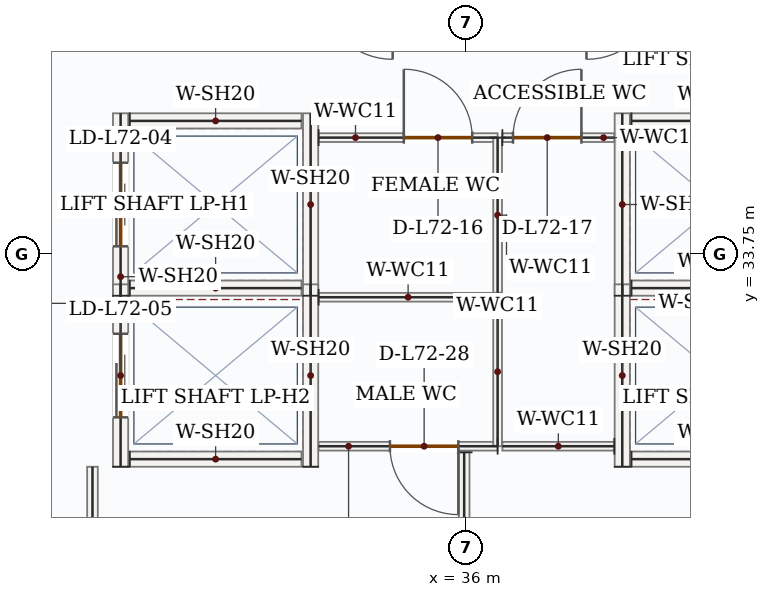
"""IFC4 building model, lengths in metres.
Left out: names, types, materials, properties, quantities, classifications, styles, units other than length and angle.
Written with IfcOpenShell. Run it as: python <this file> out.ifc"""

import sys

from ifc_helpers import new_model, si_unit, direction, frame, frame_2d, origin, place, context, subcontext, project, spatial, rectangle, extrude, source, transform, mapped, element, fill, save


model = new_model("IFC4")
c1 = context("Model", 3, precision=1e-05, world=origin(), true_north=direction((0.0, 1.0)))
c2 = subcontext(c1, "Body", "Model", "MODEL_VIEW")
j1 = project(units=[si_unit("LENGTHUNIT", "METRE"), si_unit("PLANEANGLEUNIT", "RADIAN")], contexts=[c1])
p1 = place(None, origin())
s1 = spatial("IfcSite", under=j1, at=p1, CompositionType="ELEMENT")
p2 = place(p1, origin())
s2 = spatial("IfcBuilding", under=s1, at=p2, CompositionType="ELEMENT")
p3 = place(p2, frame((0.0, 0.0, 299.1)))
s3 = spatial("IfcBuildingStorey", under=s2, at=p3, CompositionType="ELEMENT", Elevation=299.1)
p4 = place(p3, frame((31.45, 33.2, 0.0), z_axis=(0.0, 0.0, 1.0), x_axis=(0.0, 1.0, 0.0)))
e1 = element("IfcWall", 1, at=p4, inside=s3, PredefinedType="SOLIDWALL", context=c2, shape_type="SweptSolid", body=[
    extrude(rectangle(XDim=2.4, YDim=0.2, at=frame_2d((1.2, 0.0))), origin(), (0.0, 0.0, 1.0), 3.5),
])
p5 = place(p4, frame((0.65, 0.0, 0.0)))
e2 = element("IfcOpeningElement", 2, at=p5, cuts=e1, PredefinedType="OPENING", context=c2, shape_type="SweptSolid", body=[
    extrude(rectangle(XDim=1.1, YDim=2.15, at=frame_2d((0.55, 1.075))), frame((0.0, 0.11, 0.0), z_axis=(0.0, -1.0, 0.0), x_axis=(1.0, 0.0, 0.0)), (0.0, 0.0, 1.0), 0.22),
])
m1 = source(origin(), c2, "Body", "SweptSolid", [
    extrude(rectangle(XDim=2.4, YDim=0.2, at=frame_2d((1.2, 0.0))), origin(), (0.0, 0.0, 1.0), 3.5),
])
p6 = place(p3, frame((33.95, 33.2, 0.0), z_axis=(0.0, 0.0, 1.0), x_axis=(0.0, 1.0, 0.0)))
e3 = element("IfcWall", 3, at=p6, inside=s3, PredefinedType="SOLIDWALL", context=c2, shape_type="MappedRepresentation", body=[
    mapped(m1, transform((0.0, 0.0, 0.0), x_axis=(1.0, 0.0, 0.0), y_axis=(0.0, 1.0, 0.0), z_axis=(0.0, 0.0, 1.0), scale=1.0)),
])
m2 = source(origin(), c2, "Body", "SweptSolid", [
    extrude(rectangle(XDim=2.26, YDim=0.2, at=frame_2d((1.13, 0.0))), origin(), (0.0, 0.0, 1.0), 3.5),
])
for number, where, z_axis, x_axis in (
    (4, (31.57, 33.3, 0.0), (0.0, 0.0, 1.0), (1.0, 0.0, 0.0)),
    (5, (31.57, 35.5, 0.0), (0.0, 0.0, 1.0), (1.0, 0.0, 0.0)),
):
    element("IfcWall", number, at=place(p3, frame(where, z_axis=z_axis, x_axis=x_axis)), inside=s3, PredefinedType="SOLIDWALL", context=c2, shape_type="MappedRepresentation", body=[
        mapped(m2, transform((0.0, 0.0, 0.0), x_axis=(1.0, 0.0, 0.0), y_axis=(0.0, 1.0, 0.0), z_axis=(0.0, 0.0, 1.0), scale=1.0)),
    ])
p7 = place(p3, frame((31.45, 30.95, 0.0), z_axis=(0.0, 0.0, 1.0), x_axis=(0.0, 1.0, 0.0)))
e6 = element("IfcWall", 6, at=p7, inside=s3, PredefinedType="SOLIDWALL", context=c2, shape_type="SweptSolid", body=[
    extrude(rectangle(XDim=2.4, YDim=0.2, at=frame_2d((1.2, 0.0))), origin(), (0.0, 0.0, 1.0), 3.5),
])
p8 = place(p7, frame((0.65, 0.0, 0.0)))
e7 = element("IfcOpeningElement", 7, at=p8, cuts=e6, PredefinedType="OPENING", context=c2, shape_type="SweptSolid", body=[
    extrude(rectangle(XDim=1.1, YDim=2.15, at=frame_2d((0.55, 1.075))), frame((0.0, 0.11, 0.0), z_axis=(0.0, -1.0, 0.0), x_axis=(1.0, 0.0, 0.0)), (0.0, 0.0, 1.0), 0.22),
])
p9 = place(p3, frame((33.95, 30.95, 0.0), z_axis=(0.0, 0.0, 1.0), x_axis=(0.0, 1.0, 0.0)))
e8 = element("IfcWall", 8, at=p9, inside=s3, PredefinedType="SOLIDWALL", context=c2, shape_type="MappedRepresentation", body=[
    mapped(m1, transform((0.0, 0.0, 0.0), x_axis=(1.0, 0.0, 0.0), y_axis=(0.0, 1.0, 0.0), z_axis=(0.0, 0.0, 1.0), scale=1.0)),
])
p10 = place(p3, frame((31.57, 31.05, 0.0), z_axis=(0.0, 0.0, 1.0), x_axis=(1.0, 0.0, 0.0)))
e9 = element("IfcWall", 9, at=p10, inside=s3, PredefinedType="SOLIDWALL", context=c2, shape_type="MappedRepresentation", body=[
    mapped(m2, transform((0.0, 0.0, 0.0), x_axis=(1.0, 0.0, 0.0), y_axis=(0.0, 1.0, 0.0), z_axis=(0.0, 0.0, 1.0), scale=1.0)),
])
p11 = place(p3, frame((38.05, 33.2, 0.0), z_axis=(0.0, 0.0, 1.0), x_axis=(0.0, 1.0, 0.0)))
e10 = element("IfcWall", 10, at=p11, inside=s3, PredefinedType="SOLIDWALL", context=c2, shape_type="MappedRepresentation", body=[
    mapped(m1, transform((0.0, 0.0, 0.0), x_axis=(1.0, 0.0, 0.0), y_axis=(0.0, 1.0, 0.0), z_axis=(0.0, 0.0, 1.0), scale=1.0)),
])
for number, where, z_axis, x_axis in (
    (11, (38.17, 33.3, 0.0), (0.0, 0.0, 1.0), (1.0, 0.0, 0.0)),
    (12, (38.17, 35.5, 0.0), (0.0, 0.0, 1.0), (1.0, 0.0, 0.0)),
):
    element("IfcWall", number, at=place(p3, frame(where, z_axis=z_axis, x_axis=x_axis)), inside=s3, PredefinedType="SOLIDWALL", context=c2, shape_type="MappedRepresentation", body=[
        mapped(m2, transform((0.0, 0.0, 0.0), x_axis=(1.0, 0.0, 0.0), y_axis=(0.0, 1.0, 0.0), z_axis=(0.0, 0.0, 1.0), scale=1.0)),
    ])
p12 = place(p3, frame((38.05, 30.95, 0.0), z_axis=(0.0, 0.0, 1.0), x_axis=(0.0, 1.0, 0.0)))
e13 = element("IfcWall", 13, at=p12, inside=s3, PredefinedType="SOLIDWALL", context=c2, shape_type="MappedRepresentation", body=[
    mapped(m1, transform((0.0, 0.0, 0.0), x_axis=(1.0, 0.0, 0.0), y_axis=(0.0, 1.0, 0.0), z_axis=(0.0, 0.0, 1.0), scale=1.0)),
])
p13 = place(p3, frame((38.17, 31.05, 0.0), z_axis=(0.0, 0.0, 1.0), x_axis=(1.0, 0.0, 0.0)))
e14 = element("IfcWall", 14, at=p13, inside=s3, PredefinedType="SOLIDWALL", context=c2, shape_type="MappedRepresentation", body=[
    mapped(m2, transform((0.0, 0.0, 0.0), x_axis=(1.0, 0.0, 0.0), y_axis=(0.0, 1.0, 0.0), z_axis=(0.0, 0.0, 1.0), scale=1.0)),
])
p14 = place(p3, frame((36.41, 31.22, 0.0), z_axis=(0.0, 0.0, 1.0), x_axis=(-1.0, 0.0, 0.0)))
e15 = element("IfcWall", 15, at=p14, inside=s3, PredefinedType="PARTITIONING", context=c2, shape_type="SweptSolid", body=[
    extrude(rectangle(XDim=2.355, YDim=0.115, at=frame_2d((1.177, 0.0))), origin(), (0.0, 0.0, 1.0), 3.5),
])
p15 = place(p14, frame((0.517, 0.0, 0.0)))
e16 = element("IfcOpeningElement", 16, at=p15, cuts=e15, PredefinedType="OPENING", context=c2, shape_type="SweptSolid", body=[
    extrude(rectangle(XDim=0.9, YDim=2.1, at=frame_2d((0.45, 1.05))), frame((0.0, 0.067, 0.0), z_axis=(0.0, -1.0, 0.0), x_axis=(1.0, 0.0, 0.0)), (0.0, 0.0, 1.0), 0.135),
])
m3 = source(origin(), c2, "Body", "SweptSolid", [
    extrude(rectangle(XDim=2.355, YDim=0.115, at=frame_2d((1.177, 0.0))), origin(), (0.0, 0.0, 1.0), 3.5),
])
p16 = place(p3, frame((34.055, 33.18, 0.0), z_axis=(0.0, 0.0, 1.0), x_axis=(1.0, 0.0, 0.0)))
e17 = element("IfcWall", 17, at=p16, inside=s3, PredefinedType="PARTITIONING", context=c2, shape_type="MappedRepresentation", body=[
    mapped(m3, transform((0.0, 0.0, 0.0), x_axis=(1.0, 0.0, 0.0), y_axis=(0.0, 1.0, 0.0), z_axis=(0.0, 0.0, 1.0), scale=1.0)),
])
m4 = source(origin(), c2, "Body", "SweptSolid", [
    extrude(rectangle(XDim=1.96, YDim=0.115, at=frame_2d((0.98, 0.0))), origin(), (0.0, 0.0, 1.0), 3.5),
])
p17 = place(p3, frame((36.41, 33.18, 0.0), z_axis=(0.0, 0.0, 1.0), x_axis=(0.0, -1.0, 0.0)))
e18 = element("IfcWall", 18, at=p17, inside=s3, PredefinedType="PARTITIONING", context=c2, shape_type="MappedRepresentation", body=[
    mapped(m4, transform((0.0, 0.0, 0.0), x_axis=(1.0, 0.0, 0.0), y_axis=(0.0, 1.0, 0.0), z_axis=(0.0, 0.0, 1.0), scale=1.0)),
])
p18 = place(p3, frame((34.055, 35.28, 0.0), z_axis=(0.0, 0.0, 1.0), x_axis=(1.0, 0.0, 0.0)))
e19 = element("IfcWall", 19, at=p18, inside=s3, PredefinedType="PARTITIONING", context=c2, shape_type="SweptSolid", body=[
    extrude(rectangle(XDim=2.355, YDim=0.115, at=frame_2d((1.177, 0.0))), origin(), (0.0, 0.0, 1.0), 3.5),
])
p19 = place(p18, frame((1.121, 0.0, 0.0)))
e20 = element("IfcOpeningElement", 20, at=p19, cuts=e19, PredefinedType="OPENING", context=c2, shape_type="SweptSolid", body=[
    extrude(rectangle(XDim=0.9, YDim=2.1, at=frame_2d((0.45, 1.05))), frame((0.0, 0.067, 0.0), z_axis=(0.0, -1.0, 0.0), x_axis=(1.0, 0.0, 0.0)), (0.0, 0.0, 1.0), 0.135),
])
m5 = source(origin(), c2, "Body", "SweptSolid", [
    extrude(rectangle(XDim=2.04, YDim=0.115, at=frame_2d((1.02, 0.0))), origin(), (0.0, 0.0, 1.0), 3.5),
])
p20 = place(p3, frame((36.41, 35.28, 0.0), z_axis=(0.0, 0.0, 1.0), x_axis=(0.0, -1.0, 0.0)))
e21 = element("IfcWall", 21, at=p20, inside=s3, PredefinedType="PARTITIONING", context=c2, shape_type="MappedRepresentation", body=[
    mapped(m5, transform((0.0, 0.0, 0.0), x_axis=(1.0, 0.0, 0.0), y_axis=(0.0, 1.0, 0.0), z_axis=(0.0, 0.0, 1.0), scale=1.0)),
])
m6 = source(origin(), c2, "Body", "SweptSolid", [
    extrude(rectangle(XDim=1.473, YDim=0.115, at=frame_2d((0.736, 0.0))), origin(), (0.0, 0.0, 1.0), 3.5),
])
p21 = place(p3, frame((37.945, 31.22, 0.0), z_axis=(0.0, 0.0, 1.0), x_axis=(-1.0, 0.0, 0.0)))
e22 = element("IfcWall", 22, at=p21, inside=s3, PredefinedType="PARTITIONING", context=c2, shape_type="MappedRepresentation", body=[
    mapped(m6, transform((0.0, 0.0, 0.0), x_axis=(1.0, 0.0, 0.0), y_axis=(0.0, 1.0, 0.0), z_axis=(0.0, 0.0, 1.0), scale=1.0)),
])
p22 = place(p3, frame((36.472, 35.28, 0.0), z_axis=(0.0, 0.0, 1.0), x_axis=(1.0, 0.0, 0.0)))
e23 = element("IfcWall", 23, at=p22, inside=s3, PredefinedType="PARTITIONING", context=c2, shape_type="SweptSolid", body=[
    extrude(rectangle(XDim=1.473, YDim=0.115, at=frame_2d((0.736, 0.0))), origin(), (0.0, 0.0, 1.0), 3.5),
])
p23 = place(p22, frame((0.14, 0.0, 0.0)))
e24 = element("IfcOpeningElement", 24, at=p23, cuts=e23, PredefinedType="OPENING", context=c2, shape_type="SweptSolid", body=[
    extrude(rectangle(XDim=0.9, YDim=2.1, at=frame_2d((0.45, 1.05))), frame((0.0, 0.067, 0.0), z_axis=(0.0, -1.0, 0.0), x_axis=(1.0, 0.0, 0.0)), (0.0, 0.0, 1.0), 0.135),
])
m7 = source(origin(), c2, "Body", "SweptSolid", [
    extrude(rectangle(XDim=3.2, YDim=0.14, at=frame_2d((1.6, 0.0))), origin(), (0.0, 0.0, 1.0), 3.5),
])
p24 = place(p3, frame((35.97, 31.14, 0.0), z_axis=(0.0, 0.0, 1.0), x_axis=(0.0, -1.0, 0.0)))
e25 = element("IfcWall", 25, at=p24, inside=s3, PredefinedType="PARTITIONING", context=c2, shape_type="MappedRepresentation", body=[
    mapped(m7, transform((0.0, 0.0, 0.0), x_axis=(1.0, 0.0, 0.0), y_axis=(0.0, 1.0, 0.0), z_axis=(0.0, 0.0, 1.0), scale=1.0)),
])
m8 = source(origin(), c2, "Body", "SweptSolid", [
    extrude(rectangle(XDim=2.935, YDim=0.14, at=frame_2d((1.468, 0.0))), origin(), (0.0, 0.0, 1.0), 3.5),
])
p25 = place(p3, frame((31.08, 28.015, 0.0), z_axis=(0.0, 0.0, 1.0), x_axis=(0.0, 1.0, 0.0)))
e26 = element("IfcWall", 26, at=p25, inside=s3, PredefinedType="PARTITIONING", context=c2, shape_type="MappedRepresentation", body=[
    mapped(m8, transform((0.0, 0.0, 0.0), x_axis=(1.0, 0.0, 0.0), y_axis=(0.0, 1.0, 0.0), z_axis=(0.0, 0.0, 1.0), scale=1.0)),
])
m9 = source(origin(), c2, "Body", "SweptSolid", [
    extrude(rectangle(XDim=1.1, YDim=2.15, at=frame_2d((0.55, 1.075))), frame((0.0, 0.025, 0.0), z_axis=(0.0, -1.0, 0.0), x_axis=(1.0, 0.0, 0.0)), (0.0, 0.0, 1.0), 0.05),
])
p26 = place(p5, origin())
e27 = element("IfcDoor", 27, at=p26, inside=s3, OperationType="DOUBLE_DOOR_SLIDING", PredefinedType="DOOR", context=c2, shape_type="MappedRepresentation", body=[
    mapped(m9, transform((0.0, 0.0, 0.0), x_axis=(1.0, 0.0, 0.0), y_axis=(0.0, 1.0, 0.0), z_axis=(0.0, 0.0, 1.0), scale=1.0)),
])
fill(e2, e27)
p27 = place(p8, origin())
e28 = element("IfcDoor", 28, at=p27, inside=s3, OperationType="DOUBLE_DOOR_SLIDING", PredefinedType="DOOR", context=c2, shape_type="MappedRepresentation", body=[
    mapped(m9, transform((0.0, 0.0, 0.0), x_axis=(1.0, 0.0, 0.0), y_axis=(0.0, 1.0, 0.0), z_axis=(0.0, 0.0, 1.0), scale=1.0)),
])
fill(e7, e28)
m10 = source(origin(), c2, "Body", "SweptSolid", [
    extrude(rectangle(XDim=0.9, YDim=2.1, at=frame_2d((0.45, 1.05))), frame((0.0, 0.025, 0.0), z_axis=(0.0, -1.0, 0.0), x_axis=(1.0, 0.0, 0.0)), (0.0, 0.0, 1.0), 0.05),
])
p28 = place(p19, origin())
e29 = element("IfcDoor", 29, at=p28, inside=s3, OperationType="SINGLE_SWING_LEFT", PredefinedType="DOOR", context=c2, shape_type="MappedRepresentation", body=[
    mapped(m10, transform((0.0, 0.0, 0.0), x_axis=(1.0, 0.0, 0.0), y_axis=(0.0, 1.0, 0.0), z_axis=(0.0, 0.0, 1.0), scale=1.0)),
])
fill(e20, e29)
p29 = place(p23, origin())
e30 = element("IfcDoor", 30, at=p29, inside=s3, OperationType="SINGLE_SWING_RIGHT", PredefinedType="DOOR", context=c2, shape_type="MappedRepresentation", body=[
    mapped(m10, transform((0.0, 0.0, 0.0), x_axis=(1.0, 0.0, 0.0), y_axis=(0.0, 1.0, 0.0), z_axis=(0.0, 0.0, 1.0), scale=1.0)),
])
fill(e24, e30)
p30 = place(p15, origin())
e31 = element("IfcDoor", 31, at=p30, inside=s3, OperationType="SINGLE_SWING_LEFT", PredefinedType="DOOR", context=c2, shape_type="MappedRepresentation", body=[
    mapped(m10, transform((0.0, 0.0, 0.0), x_axis=(1.0, 0.0, 0.0), y_axis=(0.0, 1.0, 0.0), z_axis=(0.0, 0.0, 1.0), scale=1.0)),
])
fill(e16, e31)
save(model, sys.argv[1])
